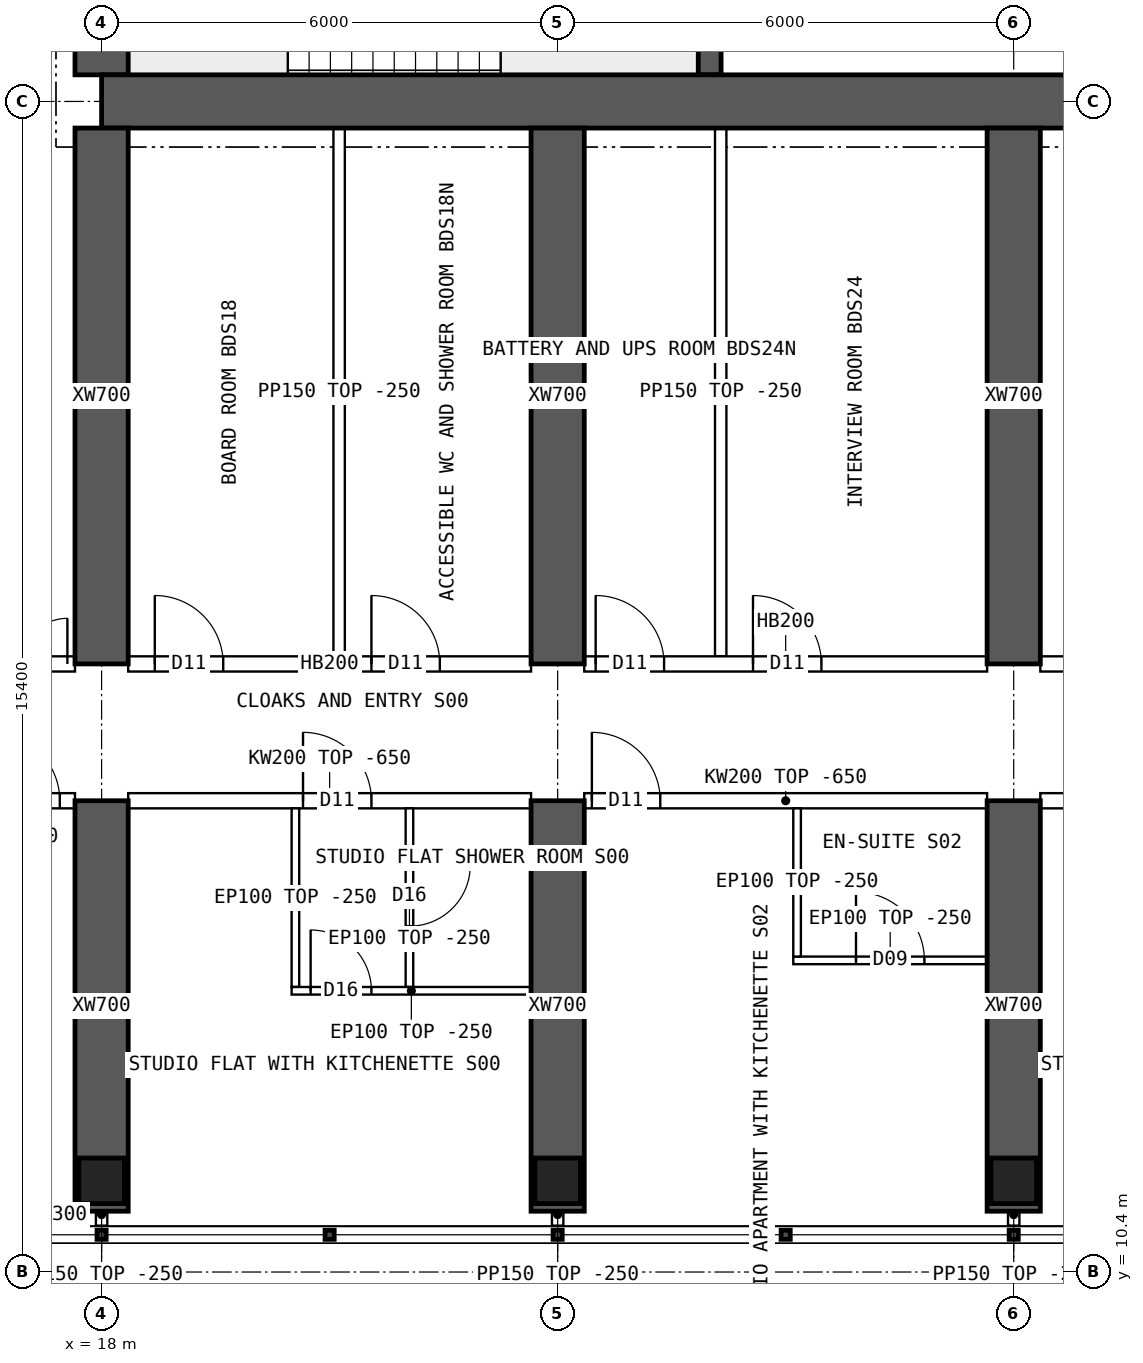
"""IFC4 building model, lengths in metres.
Left out: names, types, materials, properties, quantities, classifications, styles, units other than length and angle.
Written with IfcOpenShell. Run it as: python <this file> out.ifc"""

import sys

from ifc_helpers import new_model, si_unit, direction, frame, frame_2d, origin, origin_2d, place, context, subcontext, project, spatial, polyline, rectangle, hollow_rectangle, outline, extrude, element, fill, save


model = new_model("IFC4")
c1 = context("Model", 3, precision=1e-05, world=origin(), true_north=direction((0.0, 1.0)))
c2 = subcontext(c1, "Body", "Model", "MODEL_VIEW")
j1 = project(units=[si_unit("LENGTHUNIT", "METRE"), si_unit("PLANEANGLEUNIT", "RADIAN")], contexts=[c1])
p1 = place(None, origin())
s1 = spatial("IfcSite", under=j1, at=p1, CompositionType="ELEMENT")
p2 = place(p1, origin())
s2 = spatial("IfcBuilding", under=s1, at=p2, CompositionType="ELEMENT")
p3 = place(p2, frame((0.0, 0.0, 224.05)))
s3 = spatial("IfcBuildingStorey", under=s2, at=p3, CompositionType="ELEMENT", Elevation=224.05)
for number, where, z_axis, x_axis in (
    (1, (18.0, 11.6, 0.0), (0.0, 0.0, 1.0), (1.0, 0.0, 0.0)),
    (2, (24.0, 11.6, 0.0), (0.0, 0.0, 1.0), (1.0, 0.0, 0.0)),
    (3, (30.0, 11.6, 0.0), (0.0, 0.0, 1.0), (1.0, 0.0, 0.0)),
):
    element("IfcColumn", number, at=place(p3, frame(where, z_axis=z_axis, x_axis=x_axis)), inside=s3, PredefinedType="COLUMN", context=c2, shape_type="SweptSolid", body=[
        extrude(hollow_rectangle(XDim=0.6, YDim=0.6, WallThickness=0.06, at=origin_2d()), origin(), (0.0, 0.0, 1.0), 3.75),
    ])
p4 = place(p3, frame((18.0, 25.8, 0.0), z_axis=(0.0, 0.0, 1.0), x_axis=(1.0, 0.0, 0.0)))
e4 = element("IfcWall", 4, at=p4, inside=s3, PredefinedType="SHEAR", context=c2, shape_type="SweptSolid", body=[
    extrude(rectangle(XDim=48.0, YDim=0.7, at=frame_2d((24.0, 0.0))), origin(), (0.0, 0.0, 1.0), 3.75),
])
p5 = place(p3, frame((18.0, 26.15, 0.0), z_axis=(0.0, 0.0, 1.0), x_axis=(0.0, 1.0, 0.0)))
e5 = element("IfcWall", 5, at=p5, inside=s3, PredefinedType="SHEAR", context=c2, shape_type="SweptSolid", body=[
    extrude(rectangle(XDim=11.7, YDim=0.7, at=frame_2d((5.85, 0.0))), origin(), (0.0, 0.0, 1.0), 3.75),
])
p6 = place(p5, frame((5.15, 0.0, 0.0)))
e6 = element("IfcOpeningElement", 6, at=p6, cuts=e5, PredefinedType="OPENING", context=c2, shape_type="SweptSolid", body=[
    extrude(rectangle(XDim=1.2, YDim=2.1, at=frame_2d((0.6, 1.05))), frame((0.0, 0.36, 0.0), z_axis=(0.0, -1.0, 0.0), x_axis=(1.0, 0.0, 0.0)), (0.0, 0.0, 1.0), 0.72),
])
p7 = place(p3, frame((26.0, 26.15, 0.0), z_axis=(0.0, 0.0, 1.0), x_axis=(0.0, 1.0, 0.0)))
e7 = element("IfcWall", 7, at=p7, inside=s3, PredefinedType="SHEAR", context=c2, shape_type="SweptSolid", body=[
    extrude(rectangle(XDim=4.1, YDim=0.3, at=frame_2d((2.05, 0.0))), origin(), (0.0, 0.0, 1.0), 3.75),
])
p8 = place(p3, frame((18.0, 11.2, 0.0), z_axis=(0.0, 0.0, 1.0), x_axis=(0.0, 1.0, 0.0)))
e8 = element("IfcWall", 8, at=p8, inside=s3, PredefinedType="SHEAR", context=c2, shape_type="SweptSolid", body=[
    extrude(rectangle(XDim=5.4, YDim=0.7, at=frame_2d((2.7, 0.0))), origin(), (0.0, 0.0, 1.0), 3.75),
])
p9 = place(p3, frame((18.0, 18.4, 0.0), z_axis=(0.0, 0.0, 1.0), x_axis=(0.0, 1.0, 0.0)))
e9 = element("IfcWall", 9, at=p9, inside=s3, PredefinedType="SHEAR", context=c2, shape_type="SweptSolid", body=[
    extrude(rectangle(XDim=7.05, YDim=0.7, at=frame_2d((3.525, 0.0))), origin(), (0.0, 0.0, 1.0), 3.75),
])
p10 = place(p3, frame((24.0, 11.2, 0.0), z_axis=(0.0, 0.0, 1.0), x_axis=(0.0, 1.0, 0.0)))
e10 = element("IfcWall", 10, at=p10, inside=s3, PredefinedType="SHEAR", context=c2, shape_type="SweptSolid", body=[
    extrude(rectangle(XDim=5.4, YDim=0.7, at=frame_2d((2.7, 0.0))), origin(), (0.0, 0.0, 1.0), 3.75),
])
p11 = place(p3, frame((24.0, 18.4, 0.0), z_axis=(0.0, 0.0, 1.0), x_axis=(0.0, 1.0, 0.0)))
e11 = element("IfcWall", 11, at=p11, inside=s3, PredefinedType="SHEAR", context=c2, shape_type="SweptSolid", body=[
    extrude(rectangle(XDim=7.05, YDim=0.7, at=frame_2d((3.525, 0.0))), origin(), (0.0, 0.0, 1.0), 3.75),
])
p12 = place(p3, frame((30.0, 11.2, 0.0), z_axis=(0.0, 0.0, 1.0), x_axis=(0.0, 1.0, 0.0)))
e12 = element("IfcWall", 12, at=p12, inside=s3, PredefinedType="SHEAR", context=c2, shape_type="SweptSolid", body=[
    extrude(rectangle(XDim=5.4, YDim=0.7, at=frame_2d((2.7, 0.0))), origin(), (0.0, 0.0, 1.0), 3.75),
])
p13 = place(p3, frame((30.0, 18.4, 0.0), z_axis=(0.0, 0.0, 1.0), x_axis=(0.0, 1.0, 0.0)))
e13 = element("IfcWall", 13, at=p13, inside=s3, PredefinedType="SHEAR", context=c2, shape_type="SweptSolid", body=[
    extrude(rectangle(XDim=7.05, YDim=0.7, at=frame_2d((3.525, 0.0))), origin(), (0.0, 0.0, 1.0), 3.75),
])
p14 = place(p3, frame((17.2, 11.15, 0.0), z_axis=(0.0, 0.0, 1.0), x_axis=(1.0, 0.0, 0.0)))
e14 = element("IfcWall", 14, at=p14, inside=s3, PredefinedType="SOLIDWALL", context=c2, shape_type="SweptSolid", body=[
    extrude(rectangle(XDim=0.45, YDim=0.3, at=frame_2d((0.225, 0.0))), origin(), (0.0, 0.0, 1.0), 3.5),
])
p15 = place(p3, frame((15.6, 16.6, 0.0), z_axis=(0.0, 0.0, 1.0), x_axis=(1.0, 0.0, 0.0)))
e15 = element("IfcWall", 15, at=p15, inside=s3, PredefinedType="SOLIDWALL", context=c2, shape_type="SweptSolid", body=[
    extrude(rectangle(XDim=2.05, YDim=0.2, at=frame_2d((1.025, 0.0))), origin(), (0.0, 0.0, 1.0), 3.5),
])
p16 = place(p15, frame((0.95, 0.0, 0.0)))
e16 = element("IfcOpeningElement", 16, at=p16, cuts=e15, PredefinedType="OPENING", context=c2, shape_type="SweptSolid", body=[
    extrude(rectangle(XDim=0.9, YDim=2.1, at=frame_2d((0.45, 1.05))), frame((0.0, 0.11, 0.0), z_axis=(0.0, -1.0, 0.0), x_axis=(1.0, 0.0, 0.0)), (0.0, 0.0, 1.0), 0.22),
])
p17 = place(p3, frame((15.6, 18.4, 0.0), z_axis=(0.0, 0.0, 1.0), x_axis=(1.0, 0.0, 0.0)))
e17 = element("IfcWall", 17, at=p17, inside=s3, PredefinedType="SOLIDWALL", context=c2, shape_type="SweptSolid", body=[
    extrude(rectangle(XDim=2.05, YDim=0.2, at=frame_2d((1.025, 0.0))), origin(), (0.0, 0.0, 1.0), 3.5),
])
p18 = place(p17, frame((0.75, 0.0, 0.0)))
e18 = element("IfcOpeningElement", 18, at=p18, cuts=e17, PredefinedType="OPENING", context=c2, shape_type="SweptSolid", body=[
    extrude(rectangle(XDim=1.2, YDim=2.1, at=frame_2d((0.6, 1.05))), frame((0.0, 0.11, 0.0), z_axis=(0.0, -1.0, 0.0), x_axis=(1.0, 0.0, 0.0)), (0.0, 0.0, 1.0), 0.22),
])
p19 = place(p3, frame((18.35, 16.6, 0.0), z_axis=(0.0, 0.0, 1.0), x_axis=(1.0, 0.0, 0.0)))
e19 = element("IfcWall", 19, at=p19, inside=s3, PredefinedType="SOLIDWALL", context=c2, shape_type="SweptSolid", body=[
    extrude(outline(polyline([(0.0, 0.0), (5.3, 0.0), (5.3, 3.1), (0.0, 3.1), (0.0, 0.0)])), frame((0.0, 0.1, 0.0), z_axis=(0.0, -1.0, 0.0), x_axis=(1.0, 0.0, 0.0)), (0.0, 0.0, 1.0), 0.2),
])
p20 = place(p19, frame((2.3, 0.0, 0.0)))
e20 = element("IfcOpeningElement", 20, at=p20, cuts=e19, PredefinedType="OPENING", context=c2, shape_type="SweptSolid", body=[
    extrude(rectangle(XDim=0.9, YDim=2.1, at=frame_2d((0.45, 1.05))), frame((0.0, 0.11, 0.0), z_axis=(0.0, -1.0, 0.0), x_axis=(1.0, 0.0, 0.0)), (0.0, 0.0, 1.0), 0.22),
])
p21 = place(p3, frame((18.35, 18.4, 0.0), z_axis=(0.0, 0.0, 1.0), x_axis=(1.0, 0.0, 0.0)))
e21 = element("IfcWall", 21, at=p21, inside=s3, PredefinedType="SOLIDWALL", context=c2, shape_type="SweptSolid", body=[
    extrude(rectangle(XDim=5.3, YDim=0.2, at=frame_2d((2.65, 0.0))), origin(), (0.0, 0.0, 1.0), 3.5),
])
p22 = place(p21, frame((0.35, 0.0, 0.0)))
e22 = element("IfcOpeningElement", 22, at=p22, cuts=e21, PredefinedType="OPENING", context=c2, shape_type="SweptSolid", body=[
    extrude(rectangle(XDim=0.9, YDim=2.1, at=frame_2d((0.45, 1.05))), frame((0.0, 0.11, 0.0), z_axis=(0.0, -1.0, 0.0), x_axis=(1.0, 0.0, 0.0)), (0.0, 0.0, 1.0), 0.22),
])
p23 = place(p21, frame((3.2, 0.0, 0.0)))
e23 = element("IfcOpeningElement", 23, at=p23, cuts=e21, PredefinedType="OPENING", context=c2, shape_type="SweptSolid", body=[
    extrude(rectangle(XDim=0.9, YDim=2.1, at=frame_2d((0.45, 1.05))), frame((0.0, 0.11, 0.0), z_axis=(0.0, -1.0, 0.0), x_axis=(1.0, 0.0, 0.0)), (0.0, 0.0, 1.0), 0.22),
])
p24 = place(p3, frame((24.35, 16.6, 0.0), z_axis=(0.0, 0.0, 1.0), x_axis=(1.0, 0.0, 0.0)))
e24 = element("IfcWall", 24, at=p24, inside=s3, PredefinedType="SOLIDWALL", context=c2, shape_type="SweptSolid", body=[
    extrude(outline(polyline([(0.0, 0.0), (5.3, 0.0), (5.3, 3.1), (0.0, 3.1), (0.0, 0.0)])), frame((0.0, 0.1, 0.0), z_axis=(0.0, -1.0, 0.0), x_axis=(1.0, 0.0, 0.0)), (0.0, 0.0, 1.0), 0.2),
])
p25 = place(p24, frame((0.1, 0.0, 0.0)))
e25 = element("IfcOpeningElement", 25, at=p25, cuts=e24, PredefinedType="OPENING", context=c2, shape_type="SweptSolid", body=[
    extrude(rectangle(XDim=0.9, YDim=2.1, at=frame_2d((0.45, 1.05))), frame((0.0, 0.11, 0.0), z_axis=(0.0, -1.0, 0.0), x_axis=(1.0, 0.0, 0.0)), (0.0, 0.0, 1.0), 0.22),
])
p26 = place(p3, frame((24.35, 18.4, 0.0), z_axis=(0.0, 0.0, 1.0), x_axis=(1.0, 0.0, 0.0)))
e26 = element("IfcWall", 26, at=p26, inside=s3, PredefinedType="SOLIDWALL", context=c2, shape_type="SweptSolid", body=[
    extrude(rectangle(XDim=5.3, YDim=0.2, at=frame_2d((2.65, 0.0))), origin(), (0.0, 0.0, 1.0), 3.5),
])
p27 = place(p26, frame((0.15, 0.0, 0.0)))
e27 = element("IfcOpeningElement", 27, at=p27, cuts=e26, PredefinedType="OPENING", context=c2, shape_type="SweptSolid", body=[
    extrude(rectangle(XDim=0.9, YDim=2.1, at=frame_2d((0.45, 1.05))), frame((0.0, 0.11, 0.0), z_axis=(0.0, -1.0, 0.0), x_axis=(1.0, 0.0, 0.0)), (0.0, 0.0, 1.0), 0.22),
])
p28 = place(p26, frame((2.22, 0.0, 0.0)))
e28 = element("IfcOpeningElement", 28, at=p28, cuts=e26, PredefinedType="OPENING", context=c2, shape_type="SweptSolid", body=[
    extrude(rectangle(XDim=0.9, YDim=2.1, at=frame_2d((0.45, 1.05))), frame((0.0, 0.11, 0.0), z_axis=(0.0, -1.0, 0.0), x_axis=(1.0, 0.0, 0.0)), (0.0, 0.0, 1.0), 0.22),
])
p29 = place(p3, frame((30.35, 16.6, 0.0), z_axis=(0.0, 0.0, 1.0), x_axis=(1.0, 0.0, 0.0)))
e29 = element("IfcWall", 29, at=p29, inside=s3, PredefinedType="SOLIDWALL", context=c2, shape_type="SweptSolid", body=[
    extrude(outline(polyline([(0.0, 0.0), (5.3, 0.0), (5.3, 3.1), (0.0, 3.1), (0.0, 0.0)])), frame((0.0, 0.1, 0.0), z_axis=(0.0, -1.0, 0.0), x_axis=(1.0, 0.0, 0.0)), (0.0, 0.0, 1.0), 0.2),
])
p30 = place(p29, frame((2.3, 0.0, 0.0)))
e30 = element("IfcOpeningElement", 30, at=p30, cuts=e29, PredefinedType="OPENING", context=c2, shape_type="SweptSolid", body=[
    extrude(rectangle(XDim=0.9, YDim=2.1, at=frame_2d((0.45, 1.05))), frame((0.0, 0.11, 0.0), z_axis=(0.0, -1.0, 0.0), x_axis=(1.0, 0.0, 0.0)), (0.0, 0.0, 1.0), 0.22),
])
p31 = place(p3, frame((30.35, 18.4, 0.0), z_axis=(0.0, 0.0, 1.0), x_axis=(1.0, 0.0, 0.0)))
e31 = element("IfcWall", 31, at=p31, inside=s3, PredefinedType="SOLIDWALL", context=c2, shape_type="SweptSolid", body=[
    extrude(rectangle(XDim=5.3, YDim=0.2, at=frame_2d((2.65, 0.0))), origin(), (0.0, 0.0, 1.0), 3.5),
])
p32 = place(p31, frame((0.8, 0.0, 0.0)))
e32 = element("IfcOpeningElement", 32, at=p32, cuts=e31, PredefinedType="OPENING", context=c2, shape_type="SweptSolid", body=[
    extrude(rectangle(XDim=1.0, YDim=2.1, at=frame_2d((0.5, 1.05))), frame((0.0, 0.11, 0.0), z_axis=(0.0, -1.0, 0.0), x_axis=(1.0, 0.0, 0.0)), (0.0, 0.0, 1.0), 0.22),
])
p33 = place(p3, frame((23.65, 14.1, 0.0), z_axis=(0.0, 0.0, 1.0), x_axis=(-1.0, 0.0, 0.0)))
e33 = element("IfcWall", 33, at=p33, inside=s3, PredefinedType="PARTITIONING", context=c2, shape_type="SweptSolid", body=[
    extrude(rectangle(XDim=3.15, YDim=0.1, at=frame_2d((1.575, 0.0))), origin(), (0.0, 0.0, 1.0), 3.5),
])
p34 = place(p33, frame((2.1, 0.0, 0.0)))
e34 = element("IfcOpeningElement", 34, at=p34, cuts=e33, PredefinedType="OPENING", context=c2, shape_type="SweptSolid", body=[
    extrude(rectangle(XDim=0.8, YDim=2.1, at=frame_2d((0.4, 1.05))), frame((0.0, 0.06, 0.0), z_axis=(0.0, -1.0, 0.0), x_axis=(1.0, 0.0, 0.0)), (0.0, 0.0, 1.0), 0.12),
])
p35 = place(p3, frame((20.55, 14.15, 0.0), z_axis=(0.0, 0.0, 1.0), x_axis=(0.0, 1.0, 0.0)))
e35 = element("IfcWall", 35, at=p35, inside=s3, PredefinedType="PARTITIONING", context=c2, shape_type="SweptSolid", body=[
    extrude(outline(polyline([(0.0, 0.0), (2.35, 0.0), (2.35, 3.1), (2.302, 3.1), (2.3, 3.5), (0.0, 3.5), (0.0, 0.0)])), frame((0.0, 0.05, 0.0), z_axis=(0.0, -1.0, 0.0), x_axis=(1.0, 0.0, 0.0)), (0.0, 0.0, 1.0), 0.1),
])
p36 = place(p3, frame((22.05, 14.15, 0.0), z_axis=(0.0, 0.0, 1.0), x_axis=(0.0, 1.0, 0.0)))
e36 = element("IfcWall", 36, at=p36, inside=s3, PredefinedType="PARTITIONING", context=c2, shape_type="SweptSolid", body=[
    extrude(outline(polyline([(0.0, 0.0), (2.35, 0.0), (2.35, 3.1), (2.302, 3.1), (2.3, 3.5), (0.0, 3.5), (0.0, 0.0)])), frame((0.0, 0.05, 0.0), z_axis=(0.0, -1.0, 0.0), x_axis=(1.0, 0.0, 0.0)), (0.0, 0.0, 1.0), 0.1),
])
p37 = place(p36, frame((0.8, 0.0, 0.0)))
e37 = element("IfcOpeningElement", 37, at=p37, cuts=e36, PredefinedType="OPENING", context=c2, shape_type="SweptSolid", body=[
    extrude(rectangle(XDim=0.8, YDim=2.1, at=frame_2d((0.4, 1.05))), frame((0.0, 0.06, 0.0), z_axis=(0.0, -1.0, 0.0), x_axis=(1.0, 0.0, 0.0)), (0.0, 0.0, 1.0), 0.12),
])
p38 = place(p3, frame((29.65, 14.5, 0.0), z_axis=(0.0, 0.0, 1.0), x_axis=(-1.0, 0.0, 0.0)))
e38 = element("IfcWall", 38, at=p38, inside=s3, PredefinedType="PARTITIONING", context=c2, shape_type="SweptSolid", body=[
    extrude(rectangle(XDim=2.55, YDim=0.1, at=frame_2d((1.275, 0.0))), origin(), (0.0, 0.0, 1.0), 3.5),
])
p39 = place(p38, frame((0.825, 0.0, 0.0)))
e39 = element("IfcOpeningElement", 39, at=p39, cuts=e38, PredefinedType="OPENING", context=c2, shape_type="SweptSolid", body=[
    extrude(rectangle(XDim=0.9, YDim=2.1, at=frame_2d((0.45, 1.05))), frame((0.0, 0.06, 0.0), z_axis=(0.0, -1.0, 0.0), x_axis=(1.0, 0.0, 0.0)), (0.0, 0.0, 1.0), 0.12),
])
p40 = place(p3, frame((27.15, 14.55, 0.0), z_axis=(0.0, 0.0, 1.0), x_axis=(0.0, 1.0, 0.0)))
e40 = element("IfcWall", 40, at=p40, inside=s3, PredefinedType="PARTITIONING", context=c2, shape_type="SweptSolid", body=[
    extrude(outline(polyline([(0.0, 0.0), (1.95, 0.0), (1.95, 3.1), (1.902, 3.1), (1.9, 3.5), (0.0, 3.5), (0.0, 0.0)])), frame((0.0, 0.05, 0.0), z_axis=(0.0, -1.0, 0.0), x_axis=(1.0, 0.0, 0.0)), (0.0, 0.0, 1.0), 0.1),
])
for number, where, z_axis, x_axis in (
    (41, (21.125, 18.5, 0.0), (0.0, 0.0, 1.0), (0.0, 1.0, 0.0)),
    (42, (26.145, 18.5, 0.0), (0.0, 0.0, 1.0), (0.0, 1.0, 0.0)),
):
    element("IfcWall", number, at=place(p3, frame(where, z_axis=z_axis, x_axis=x_axis)), inside=s3, PredefinedType="PARTITIONING", context=c2, shape_type="SweptSolid", body=[
        extrude(rectangle(XDim=6.95, YDim=0.15, at=frame_2d((3.475, 0.0))), origin(), (0.0, 0.0, 1.0), 3.5),
    ])
for number, where, z_axis, x_axis in (
    (43, (18.0, 11.3, 0.0), (0.0, 0.0, 1.0), (0.0, -1.0, 0.0)),
    (44, (24.0, 11.3, 0.0), (0.0, 0.0, 1.0), (0.0, -1.0, 0.0)),
    (45, (30.0, 11.3, 0.0), (0.0, 0.0, 1.0), (0.0, -1.0, 0.0)),
):
    element("IfcWall", number, at=place(p3, frame(where, z_axis=z_axis, x_axis=x_axis)), inside=s3, PredefinedType="PARTITIONING", context=c2, shape_type="SweptSolid", body=[
        extrude(rectangle(XDim=0.29, YDim=0.15, at=frame_2d((0.145, 0.0))), origin(), (0.0, 0.0, 1.0), 3.5),
    ])
p41 = place(p18, origin())
e46 = element("IfcDoor", 46, at=p41, inside=s3, OperationType="DOUBLE_DOOR_SINGLE_SWING", PredefinedType="DOOR", context=c2, shape_type="SweptSolid", body=[
    extrude(rectangle(XDim=1.2, YDim=2.1, at=frame_2d((0.6, 1.05))), frame((0.0, 0.025, 0.0), z_axis=(0.0, -1.0, 0.0), x_axis=(1.0, 0.0, 0.0)), (0.0, 0.0, 1.0), 0.05),
])
fill(e18, e46)
p42 = place(p34, origin())
e47 = element("IfcDoor", 47, at=p42, inside=s3, OperationType="SINGLE_SWING_RIGHT", PredefinedType="DOOR", context=c2, shape_type="SweptSolid", body=[
    extrude(rectangle(XDim=0.8, YDim=2.1, at=frame_2d((0.4, 1.05))), frame((0.0, 0.025, 0.0), z_axis=(0.0, -1.0, 0.0), x_axis=(1.0, 0.0, 0.0)), (0.0, 0.0, 1.0), 0.05),
])
fill(e34, e47)
p43 = place(p37, origin())
e48 = element("IfcDoor", 48, at=p43, inside=s3, OperationType="SINGLE_SWING_RIGHT", PredefinedType="DOOR", context=c2, shape_type="SweptSolid", body=[
    extrude(rectangle(XDim=0.8, YDim=2.1, at=frame_2d((0.4, 1.05))), frame((0.0, 0.025, 0.0), z_axis=(0.0, -1.0, 0.0), x_axis=(1.0, 0.0, 0.0)), (0.0, 0.0, 1.0), 0.05),
])
fill(e37, e48)
p44 = place(p20, origin())
e49 = element("IfcDoor", 49, at=p44, inside=s3, OperationType="SINGLE_SWING_LEFT", PredefinedType="DOOR", context=c2, shape_type="SweptSolid", body=[
    extrude(rectangle(XDim=0.9, YDim=2.1, at=frame_2d((0.45, 1.05))), frame((0.0, 0.025, 0.0), z_axis=(0.0, -1.0, 0.0), x_axis=(1.0, 0.0, 0.0)), (0.0, 0.0, 1.0), 0.05),
])
fill(e20, e49)
p45 = place(p39, origin())
e50 = element("IfcDoor", 50, at=p45, inside=s3, OperationType="SINGLE_SWING_RIGHT", PredefinedType="DOOR", context=c2, shape_type="SweptSolid", body=[
    extrude(rectangle(XDim=0.9, YDim=2.1, at=frame_2d((0.45, 1.05))), frame((0.0, 0.025, 0.0), z_axis=(0.0, -1.0, 0.0), x_axis=(1.0, 0.0, 0.0)), (0.0, 0.0, 1.0), 0.05),
])
fill(e39, e50)
p46 = place(p25, origin())
e51 = element("IfcDoor", 51, at=p46, inside=s3, OperationType="SINGLE_SWING_LEFT", PredefinedType="DOOR", context=c2, shape_type="SweptSolid", body=[
    extrude(rectangle(XDim=0.9, YDim=2.1, at=frame_2d((0.45, 1.05))), frame((0.0, 0.025, 0.0), z_axis=(0.0, -1.0, 0.0), x_axis=(1.0, 0.0, 0.0)), (0.0, 0.0, 1.0), 0.05),
])
fill(e25, e51)
p47 = place(p22, origin())
e52 = element("IfcDoor", 52, at=p47, inside=s3, OperationType="SINGLE_SWING_LEFT", PredefinedType="DOOR", context=c2, shape_type="SweptSolid", body=[
    extrude(rectangle(XDim=0.9, YDim=2.1, at=frame_2d((0.45, 1.05))), frame((0.0, 0.025, 0.0), z_axis=(0.0, -1.0, 0.0), x_axis=(1.0, 0.0, 0.0)), (0.0, 0.0, 1.0), 0.05),
])
fill(e22, e52)
p48 = place(p23, origin())
e53 = element("IfcDoor", 53, at=p48, inside=s3, OperationType="SINGLE_SWING_LEFT", PredefinedType="DOOR", context=c2, shape_type="SweptSolid", body=[
    extrude(rectangle(XDim=0.9, YDim=2.1, at=frame_2d((0.45, 1.05))), frame((0.0, 0.025, 0.0), z_axis=(0.0, -1.0, 0.0), x_axis=(1.0, 0.0, 0.0)), (0.0, 0.0, 1.0), 0.05),
])
fill(e23, e53)
p49 = place(p27, origin())
e54 = element("IfcDoor", 54, at=p49, inside=s3, OperationType="SINGLE_SWING_LEFT", PredefinedType="DOOR", context=c2, shape_type="SweptSolid", body=[
    extrude(rectangle(XDim=0.9, YDim=2.1, at=frame_2d((0.45, 1.05))), frame((0.0, 0.025, 0.0), z_axis=(0.0, -1.0, 0.0), x_axis=(1.0, 0.0, 0.0)), (0.0, 0.0, 1.0), 0.05),
])
fill(e27, e54)
p50 = place(p28, origin())
e55 = element("IfcDoor", 55, at=p50, inside=s3, OperationType="SINGLE_SWING_LEFT", PredefinedType="DOOR", context=c2, shape_type="SweptSolid", body=[
    extrude(rectangle(XDim=0.9, YDim=2.1, at=frame_2d((0.45, 1.05))), frame((0.0, 0.025, 0.0), z_axis=(0.0, -1.0, 0.0), x_axis=(1.0, 0.0, 0.0)), (0.0, 0.0, 1.0), 0.05),
])
fill(e28, e55)
p51 = place(p16, origin())
e56 = element("IfcDoor", 56, at=p51, inside=s3, OperationType="SINGLE_SWING_LEFT", PredefinedType="DOOR", context=c2, shape_type="SweptSolid", body=[
    extrude(rectangle(XDim=0.9, YDim=2.1, at=frame_2d((0.45, 1.05))), frame((0.0, 0.025, 0.0), z_axis=(0.0, -1.0, 0.0), x_axis=(1.0, 0.0, 0.0)), (0.0, 0.0, 1.0), 0.05),
])
fill(e16, e56)
save(model, sys.argv[1])
